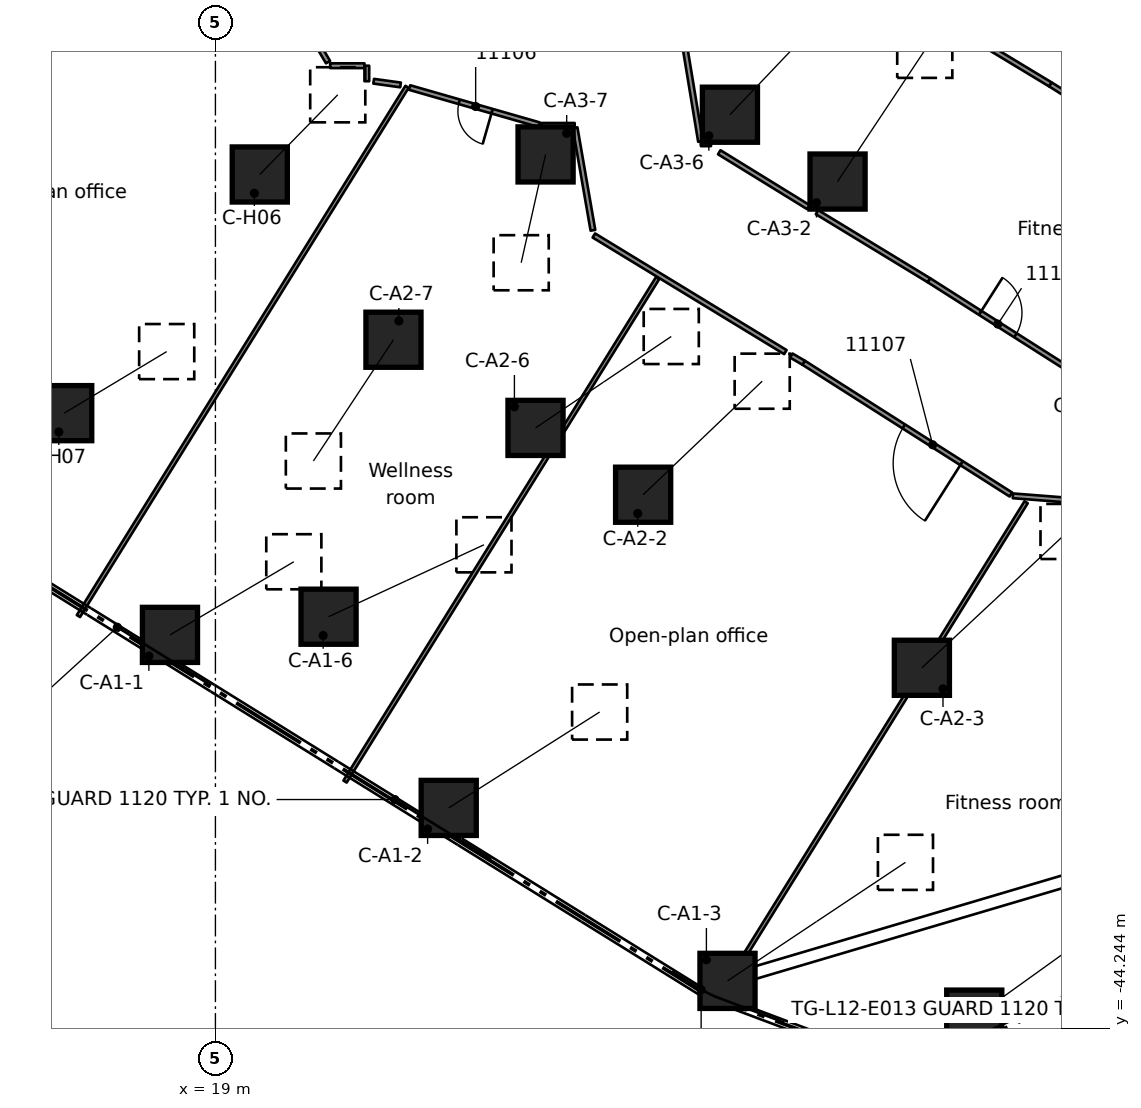
"""IFC4 building model, lengths in metres.
Left out: names, types, materials, properties, quantities, classifications, styles, units other than length and angle.
Written with IfcOpenShell. Run it as: python <this file> out.ifc"""

import sys

from ifc_helpers import new_model, si_unit, direction, frame, frame_2d, origin, origin_2d, place, context, subcontext, project, spatial, rectangle, extrude, element, fill, save


model = new_model("IFC4")
c1 = context("Model", 3, precision=1e-05, world=origin(), true_north=direction((0.0, 1.0)))
c2 = subcontext(c1, "Body", "Model", "MODEL_VIEW")
j1 = project(units=[si_unit("LENGTHUNIT", "METRE"), si_unit("PLANEANGLEUNIT", "RADIAN")], contexts=[c1])
p1 = place(None, origin())
s1 = spatial("IfcSite", under=j1, at=p1, CompositionType="ELEMENT")
p2 = place(p1, origin())
s2 = spatial("IfcBuilding", under=s1, at=p2, CompositionType="ELEMENT")
p3 = place(p2, frame((0.0, 0.0, 54.8)))
s3 = spatial("IfcBuildingStorey", under=s2, at=p3, CompositionType="ELEMENT", Elevation=54.8)
p4 = place(p3, frame((17.804, -33.888, 0.58), z_axis=(0.688751767503, 0.406574569475, 0.600265043309), x_axis=(-0.508344567939, 0.861153761094, 0.0)))
e1 = element("IfcColumn", 1, at=p4, inside=s3, PredefinedType="COLUMN", context=c2, shape_type="SweptSolid", body=[
    extrude(rectangle(XDim=1.45, YDim=1.45, at=origin_2d()), origin(), (0.0, 0.0, 1.0), 4.732),
])
p5 = place(p3, frame((25.139, -38.441, 0.626), z_axis=(0.728944787886, 0.462994187954, 0.504257749702), x_axis=(-0.536150164507, 0.844122622075, 0.0)))
e2 = element("IfcColumn", 2, at=p5, inside=s3, PredefinedType="COLUMN", context=c2, shape_type="SweptSolid", body=[
    extrude(rectangle(XDim=1.45, YDim=1.45, at=origin_2d()), origin(), (0.0, 0.0, 1.0), 5.449),
])
p6 = place(p3, frame((32.475, -42.992, 0.654), z_axis=(0.750792181677, 0.500045363689, 0.431585141294), x_axis=(-0.55432964242, 0.832297211058, 0.0)))
e3 = element("IfcColumn", 3, at=p6, inside=s3, PredefinedType="COLUMN", context=c2, shape_type="SweptSolid", body=[
    extrude(rectangle(XDim=1.45, YDim=1.45, at=origin_2d()), origin(), (0.0, 0.0, 1.0), 6.237),
])
p7 = place(p3, frame((38.968, -43.959, 0.666), z_axis=(0.746649911679, 0.535585988781, 0.394539678628), x_axis=(-0.58286895682, 0.812566169106, 0.0)))
e4 = element("IfcColumn", 4, at=p7, inside=s3, PredefinedType="COLUMN", context=c2, shape_type="SweptSolid", body=[
    extrude(rectangle(XDim=1.45, YDim=1.45, at=origin_2d()), origin(), (0.0, 0.0, 1.0), 6.761),
])
p8 = place(p3, frame((21.977, -33.41, 0.618), z_axis=(0.773592017011, 0.357927187713, 0.522918272306), x_axis=(-0.419913655206, 0.907564059542, 0.0)))
e5 = element("IfcColumn", 5, at=p8, inside=s3, PredefinedType="COLUMN", context=c2, shape_type="SweptSolid", body=[
    extrude(rectangle(XDim=1.45, YDim=1.45, at=origin_2d()), origin(), (0.0, 0.0, 1.0), 5.286),
])
p9 = place(p3, frame((30.255, -30.2, 0.61), z_axis=(0.608996447685, 0.580618057931, 0.540375792862), x_axis=(-0.690042356189, 0.723768987084, 0.0)))
e6 = element("IfcColumn", 6, at=p9, inside=s3, PredefinedType="COLUMN", context=c2, shape_type="SweptSolid", body=[
    extrude(rectangle(XDim=1.45, YDim=1.45, at=origin_2d()), origin(), (0.0, 0.0, 1.0), 5.145),
])
p10 = place(p3, frame((37.59, -34.754, 0.644), z_axis=(0.650011603321, 0.606231859074, 0.45822248809), x_axis=(-0.682050250906, 0.731305309183, 0.0)))
e7 = element("IfcColumn", 7, at=p10, inside=s3, PredefinedType="COLUMN", context=c2, shape_type="SweptSolid", body=[
    extrude(rectangle(XDim=1.45, YDim=1.45, at=origin_2d()), origin(), (0.0, 0.0, 1.0), 5.917),
])
p11 = place(p3, frame((27.423, -28.442, 0.609), z_axis=(0.69676588464, 0.469082356893, 0.542659234192), x_axis=(-0.558462658867, 0.829529661104, 0.0)))
e8 = element("IfcColumn", 8, at=p11, inside=s3, PredefinedType="COLUMN", context=c2, shape_type="SweptSolid", body=[
    extrude(rectangle(XDim=1.45, YDim=1.45, at=origin_2d()), origin(), (0.0, 0.0, 1.0), 5.126),
])
p12 = place(p3, frame((23.685, -26.122, 0.582), z_axis=(-0.442655647447, -0.670317380621, 0.59559263513), x_axis=(0.834468487345, -0.551055662913, 0.0)))
e9 = element("IfcColumn", 9, at=p12, inside=s3, PredefinedType="COLUMN", context=c2, shape_type="SweptSolid", body=[
    extrude(rectangle(XDim=1.45, YDim=1.45, at=origin_2d()), origin(), (0.0, 0.0, 1.0), 4.76),
])
p13 = place(p3, frame((35.371, -21.96, 0.601), z_axis=(0.458815633404, 0.690322287577, 0.559413401536), x_axis=(-0.832828584318, 0.553530983002, 0.0)))
e10 = element("IfcColumn", 10, at=p13, inside=s3, PredefinedType="COLUMN", context=c2, shape_type="SweptSolid", body=[
    extrude(rectangle(XDim=1.45, YDim=1.45, at=origin_2d()), origin(), (0.0, 0.0, 1.0), 5.002),
])
p14 = place(p3, frame((32.539, -20.201, 0.591), z_axis=(0.561988017013, 0.590152683579, 0.579559555869), x_axis=(-0.724176021498, 0.689615175215, 0.0)))
e11 = element("IfcColumn", 11, at=p14, inside=s3, PredefinedType="COLUMN", context=c2, shape_type="SweptSolid", body=[
    extrude(rectangle(XDim=1.45, YDim=1.45, at=origin_2d()), origin(), (0.0, 0.0, 1.0), 4.863),
])
p15 = place(p3, frame((27.688, -21.246, 0.507), z_axis=(-0.153705743536, -0.682208039655, 0.714819372314), x_axis=(0.975545729975, -0.219796562138, 0.0)))
e12 = element("IfcColumn", 12, at=p15, inside=s3, PredefinedType="COLUMN", context=c2, shape_type="SweptSolid", body=[
    extrude(rectangle(XDim=1.45, YDim=1.45, at=origin_2d()), origin(), (0.0, 0.0, 1.0), 4.177),
])
p16 = place(p3, frame((20.167, -21.774, 0.508), z_axis=(0.490424057431, 0.501160289027, 0.712967466716), x_axis=(-0.714720981693, 0.699409692761, 0.0)))
e13 = element("IfcColumn", 13, at=p16, inside=s3, PredefinedType="COLUMN", context=c2, shape_type="SweptSolid", body=[
    extrude(rectangle(XDim=1.45, YDim=1.45, at=origin_2d()), origin(), (0.0, 0.0, 1.0), 4.184),
])
p17 = place(p3, frame((15.021, -28.054, 0.53), z_axis=(0.626275485165, 0.376150796059, 0.682854007315), x_axis=(-0.514883708566, 0.857260034443, 0.0)))
e14 = element("IfcColumn", 14, at=p17, inside=s3, PredefinedType="COLUMN", context=c2, shape_type="SweptSolid", body=[
    extrude(rectangle(XDim=1.45, YDim=1.45, at=origin_2d()), origin(), (0.0, 0.0, 1.0), 4.306),
])
p18 = place(p3, frame((28.934, -23.242, 0.0), z_axis=(0.0, 0.0, 1.0), x_axis=(-0.171548017864, 0.985175759734, 0.0)))
e15 = element("IfcWall", 15, at=p18, inside=s3, PredefinedType="PARTITIONING", context=c2, shape_type="SweptSolid", body=[
    extrude(rectangle(XDim=2.74, YDim=0.125, at=frame_2d((1.37, 0.0))), origin(), (0.0, 0.0, 1.0), 3.58),
])
p19 = place(p3, frame((31.341, -18.339, 0.0), z_axis=(0.0, 0.0, 1.0), x_axis=(0.163028246139, -0.986621402039, 0.0)))
e16 = element("IfcWall", 16, at=p19, inside=s3, PredefinedType="PARTITIONING", context=c2, shape_type="SweptSolid", body=[
    extrude(rectangle(XDim=2.6, YDim=0.125, at=frame_2d((1.3, 0.0))), origin(), (0.0, 0.0, 1.0), 3.58),
])
p20 = place(p3, frame((20.145, -15.745, 0.0), z_axis=(0.0, 0.0, 1.0), x_axis=(0.509399422691, -0.860530201772, 0.0)))
e17 = element("IfcWall", 17, at=p20, inside=s3, PredefinedType="PARTITIONING", context=c2, shape_type="SweptSolid", body=[
    extrude(rectangle(XDim=3.571, YDim=0.125, at=frame_2d((1.786, 0.0))), origin(), (0.0, 0.0, 1.0), 3.58),
])
p21 = place(p3, frame((39.932, -30.195, 0.0), z_axis=(0.0, 0.0, 1.0), x_axis=(-0.843820070804, 0.536626208927, 0.0)))
e18 = element("IfcWall", 18, at=p21, inside=s3, PredefinedType="PARTITIONING", context=c2, shape_type="SweptSolid", body=[
    extrude(rectangle(XDim=6.464, YDim=0.125, at=frame_2d((3.232, 0.0))), origin(), (0.0, 0.0, 1.0), 3.58),
])
p22 = place(p21, frame((1.538, 0.0, 0.0)))
e19 = element("IfcOpeningElement", 19, at=p22, cuts=e18, PredefinedType="OPENING", context=c2, shape_type="SweptSolid", body=[
    extrude(rectangle(XDim=1.8, YDim=2.1, at=frame_2d((0.9, 1.05))), frame((0.0, 0.073, 0.0), z_axis=(0.0, -1.0, 0.0), x_axis=(1.0, 0.0, 0.0)), (0.0, 0.0, 1.0), 0.145),
])
p23 = place(p3, frame((37.774, -24.556, 0.0), z_axis=(0.0, 0.0, 1.0), x_axis=(0.843747538383, -0.53674024581, 0.0)))
e20 = element("IfcWall", 20, at=p23, inside=s3, PredefinedType="PARTITIONING", context=c2, shape_type="SweptSolid", body=[
    extrude(rectangle(XDim=4.205, YDim=0.125, at=frame_2d((2.103, 0.0))), origin(), (0.0, 0.0, 1.0), 3.58),
])
p24 = place(p23, frame((1.6, 0.0, 0.0)))
e21 = element("IfcOpeningElement", 21, at=p24, cuts=e20, PredefinedType="OPENING", context=c2, shape_type="SweptSolid", body=[
    extrude(rectangle(XDim=1.1, YDim=2.1, at=frame_2d((0.55, 1.05))), frame((0.0, 0.073, 0.0), z_axis=(0.0, -1.0, 0.0), x_axis=(1.0, 0.0, 0.0)), (0.0, 0.0, 1.0), 0.145),
])
p25 = place(p3, frame((37.774, -24.556, 0.0), z_axis=(0.0, 0.0, 1.0), x_axis=(-0.854394223193, 0.519625356747, 0.0)))
e22 = element("IfcWall", 22, at=p25, inside=s3, PredefinedType="PARTITIONING", context=c2, shape_type="SweptSolid", body=[
    extrude(rectangle(XDim=3.444, YDim=0.125, at=frame_2d((1.722, 0.0))), origin(), (0.0, 0.0, 1.0), 3.58),
])
p26 = place(p3, frame((40.972, -19.405, 0.0), z_axis=(0.0, 0.0, 1.0), x_axis=(-0.8557851023, 0.517331478534, 0.0)))
e23 = element("IfcWall", 23, at=p26, inside=s3, PredefinedType="PARTITIONING", context=c2, shape_type="SweptSolid", body=[
    extrude(rectangle(XDim=2.745, YDim=0.125, at=frame_2d((1.372, 0.0))), origin(), (0.0, 0.0, 1.0), 3.58),
])
p27 = place(p3, frame((40.972, -19.405, 0.0), z_axis=(0.0, 0.0, 1.0), x_axis=(0.847809891227, -0.530300281291, 0.0)))
e24 = element("IfcWall", 24, at=p27, inside=s3, PredefinedType="PARTITIONING", context=c2, shape_type="SweptSolid", body=[
    extrude(rectangle(XDim=4.369, YDim=0.125, at=frame_2d((2.185, 0.0))), origin(), (0.0, 0.0, 1.0), 3.58),
])
p28 = place(p3, frame((28.958, -23.379, 0.0), z_axis=(0.0, 0.0, 1.0), x_axis=(0.85410506727, -0.52010050381, 0.0)))
e25 = element("IfcWall", 25, at=p28, inside=s3, PredefinedType="PARTITIONING", context=c2, shape_type="SweptSolid", body=[
    extrude(rectangle(XDim=5.901, YDim=0.125, at=frame_2d((2.95, 0.0))), origin(), (0.0, 0.0, 1.0), 3.58),
])
p29 = place(p3, frame((32.258, -21.189, 0.0), z_axis=(0.0, 0.0, 1.0), x_axis=(0.851466744889, -0.524408602473, 0.0)))
e26 = element("IfcWall", 26, at=p29, inside=s3, PredefinedType="PARTITIONING", context=c2, shape_type="SweptSolid", body=[
    extrude(rectangle(XDim=2.758, YDim=0.125, at=frame_2d((1.379, 0.0))), origin(), (0.0, 0.0, 1.0), 3.58),
])
p30 = place(p3, frame((34.153, -26.538, 0.0), z_axis=(0.0, 0.0, 1.0), x_axis=(0.864934993762, -0.501883907458, 0.0)))
e27 = element("IfcWall", 27, at=p30, inside=s3, PredefinedType="PARTITIONING", context=c2, shape_type="SweptSolid", body=[
    extrude(rectangle(XDim=0.375, YDim=0.125, at=frame_2d((0.187, 0.0))), origin(), (0.0, 0.0, 1.0), 3.58),
])
p31 = place(p3, frame((27.518, -20.464, 0.0), z_axis=(0.0, 0.0, 1.0), x_axis=(-0.961227263948, 0.275757406143, 0.0)))
e28 = element("IfcWall", 28, at=p31, inside=s3, PredefinedType="PARTITIONING", context=c2, shape_type="SweptSolid", body=[
    extrude(rectangle(XDim=3.547, YDim=0.125, at=frame_2d((1.773, 0.0))), origin(), (0.0, 0.0, 1.0), 3.58),
])
p32 = place(p31, frame((1.288, 0.0, 0.0)))
e29 = element("IfcOpeningElement", 29, at=p32, cuts=e28, PredefinedType="OPENING", context=c2, shape_type="SweptSolid", body=[
    extrude(rectangle(XDim=0.9, YDim=2.1, at=frame_2d((0.45, 1.05))), frame((0.0, 0.073, 0.0), z_axis=(0.0, -1.0, 0.0), x_axis=(1.0, 0.0, 0.0)), (0.0, 0.0, 1.0), 0.145),
])
p33 = place(p3, frame((39.985, -30.229, 0.0), z_axis=(0.0, 0.0, 1.0), x_axis=(0.996972826888, -0.077750771356, 0.0)))
e30 = element("IfcWall", 30, at=p33, inside=s3, PredefinedType="PARTITIONING", context=c2, shape_type="SweptSolid", body=[
    extrude(rectangle(XDim=2.16, YDim=0.125, at=frame_2d((1.08, 0.0))), origin(), (0.0, 0.0, 1.0), 3.58),
])
p34 = place(p3, frame((23.164, -19.32, 0.0), z_axis=(0.0, 0.0, 1.0), x_axis=(0.990549151852, -0.137158221648, 0.0)))
e31 = element("IfcWall", 31, at=p34, inside=s3, PredefinedType="PARTITIONING", context=c2, shape_type="SweptSolid", body=[
    extrude(rectangle(XDim=0.714, YDim=0.125, at=frame_2d((0.357, 0.0))), origin(), (0.0, 0.0, 1.0), 3.58),
])
p35 = place(p3, frame((31.775, -20.966, 0.0), z_axis=(0.0, 0.0, 1.0), x_axis=(1.0, 0.0, 0.0)))
e32 = element("IfcWall", 32, at=p35, inside=s3, PredefinedType="PARTITIONING", context=c2, shape_type="SweptSolid", body=[
    extrude(rectangle(XDim=0.265, YDim=0.125, at=frame_2d((0.133, 0.0))), origin(), (0.0, 0.0, 1.0), 3.58),
])
p36 = place(p3, frame((27.578, -20.481, 0.0), z_axis=(0.0, 0.0, 1.0), x_axis=(1.0, 0.0, 0.0)))
e33 = element("IfcWall", 33, at=p36, inside=s3, PredefinedType="PARTITIONING", context=c2, shape_type="SweptSolid", body=[
    extrude(rectangle(XDim=0.875, YDim=0.125, at=frame_2d((0.438, 0.0))), origin(), (0.0, 0.0, 1.0), 3.58),
])
p37 = place(p3, frame((22.02, -18.912, 0.0), z_axis=(0.0, 0.0, 1.0), x_axis=(1.0, 0.0, 0.0)))
e34 = element("IfcWall", 34, at=p37, inside=s3, PredefinedType="PARTITIONING", context=c2, shape_type="SweptSolid", body=[
    extrude(rectangle(XDim=0.902, YDim=0.125, at=frame_2d((0.451, 0.0))), origin(), (0.0, 0.0, 1.0), 3.58),
])
p38 = place(p3, frame((32.082, -43.688, 0.0), z_axis=(0.0, 0.0, 1.0), x_axis=(0.527454544874, 0.849583252596, 0.0)))
e35 = element("IfcWall", 35, at=p38, inside=s3, PredefinedType="PARTITIONING", context=c2, shape_type="SweptSolid", body=[
    extrude(rectangle(XDim=15.643, YDim=0.1, at=frame_2d((7.822, 0.0))), origin(), (0.0, 0.0, 1.0), 3.58),
])
p39 = place(p3, frame((22.411, -37.748, 0.0), z_axis=(0.0, 0.0, 1.0), x_axis=(0.527469619433, 0.849573893535, 0.0)))
e36 = element("IfcWall", 36, at=p39, inside=s3, PredefinedType="PARTITIONING", context=c2, shape_type="SweptSolid", body=[
    extrude(rectangle(XDim=15.597, YDim=0.1, at=frame_2d((7.799, 0.0))), origin(), (0.0, 0.0, 1.0), 3.58),
])
p40 = place(p3, frame((15.395, -33.393, 0.0), z_axis=(0.0, 0.0, 1.0), x_axis=(0.52750522029, 0.84955178922, 0.0)))
e37 = element("IfcWall", 37, at=p40, inside=s3, PredefinedType="PARTITIONING", context=c2, shape_type="SweptSolid", body=[
    extrude(rectangle(XDim=16.392, YDim=0.1, at=frame_2d((8.196, 0.0))), origin(), (0.0, 0.0, 1.0), 3.58),
])
p41 = place(p3, frame((22.984, -19.32, 0.0), z_axis=(0.0, 0.0, 1.0), x_axis=(0.0, 1.0, 0.0)))
e38 = element("IfcWall", 38, at=p41, inside=s3, PredefinedType="PARTITIONING", context=c2, shape_type="SweptSolid", body=[
    extrude(rectangle(XDim=0.408, YDim=0.125, at=frame_2d((0.204, 0.0))), origin(), (0.0, 0.0, 1.0), 3.58),
])
p42 = place(p24, origin())
e39 = element("IfcDoor", 39, at=p42, inside=s3, OperationType="SINGLE_SWING_RIGHT", PredefinedType="DOOR", context=c2, shape_type="SweptSolid", body=[
    extrude(rectangle(XDim=1.1, YDim=2.1, at=frame_2d((0.55, 1.05))), frame((0.0, 0.025, 0.0), z_axis=(0.0, -1.0, 0.0), x_axis=(1.0, 0.0, 0.0)), (0.0, 0.0, 1.0), 0.05),
])
fill(e21, e39)
p43 = place(p32, origin())
e40 = element("IfcDoor", 40, at=p43, inside=s3, OperationType="SINGLE_SWING_LEFT", PredefinedType="DOOR", context=c2, shape_type="SweptSolid", body=[
    extrude(rectangle(XDim=0.9, YDim=2.1, at=frame_2d((0.45, 1.05))), frame((0.0, 0.025, 0.0), z_axis=(0.0, -1.0, 0.0), x_axis=(1.0, 0.0, 0.0)), (0.0, 0.0, 1.0), 0.05),
])
fill(e29, e40)
p44 = place(p22, origin())
e41 = element("IfcDoor", 41, at=p44, inside=s3, OperationType="DOUBLE_DOOR_SINGLE_SWING", PredefinedType="DOOR", context=c2, shape_type="SweptSolid", body=[
    extrude(rectangle(XDim=1.8, YDim=2.1, at=frame_2d((0.9, 1.05))), frame((0.0, 0.025, 0.0), z_axis=(0.0, -1.0, 0.0), x_axis=(1.0, 0.0, 0.0)), (0.0, 0.0, 1.0), 0.05),
])
fill(e19, e41)
save(model, sys.argv[1])
